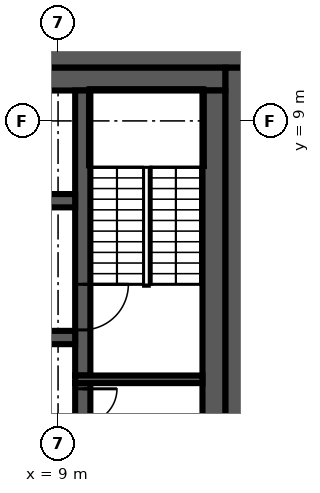
"""IFC4 building model, lengths in metres.
Left out: names, types, materials, properties, quantities, classifications, styles, units other than length and angle.
Written with IfcOpenShell. Run it as: python <this file> out.ifc"""

import sys

from ifc_helpers import new_model, si_unit, direction, frame, frame_2d, origin, place, context, subcontext, project, spatial, rectangle, extrude, element, fill, save


model = new_model("IFC4")
c1 = context("Model", 3, precision=1e-05, world=origin(), true_north=direction((0.0, 1.0)))
c2 = subcontext(c1, "Body", "Model", "MODEL_VIEW")
j1 = project(units=[si_unit("LENGTHUNIT", "METRE"), si_unit("PLANEANGLEUNIT", "RADIAN")], contexts=[c1])
p1 = place(None, origin())
s1 = spatial("IfcSite", under=j1, at=p1, CompositionType="ELEMENT")
p2 = place(p1, origin())
s2 = spatial("IfcBuilding", under=s1, at=p2, CompositionType="ELEMENT")
p3 = place(p2, frame((0.0, 0.0, 294.2)))
s3 = spatial("IfcBuildingStorey", under=s2, at=p3, CompositionType="ELEMENT", Elevation=294.2)
p4 = place(p3, frame((-14.0, 10.7, 0.0), z_axis=(0.0, 0.0, 1.0), x_axis=(1.0, 0.0, 0.0)))
e1 = element("IfcWall", 1, at=p4, inside=s3, PredefinedType="SHEAR", context=c2, shape_type="SweptSolid", body=[
    extrude(rectangle(XDim=28.0, YDim=0.6, at=frame_2d((14.0, 0.0))), origin(), (0.0, 0.0, 1.0), 3.82),
])
p5 = place(p4, frame((15.9, 0.0, 0.0)))
e2 = element("IfcOpeningElement", 2, at=p5, cuts=e1, PredefinedType="OPENING", context=c2, shape_type="SweptSolid", body=[
    extrude(rectangle(XDim=1.6, YDim=2.1, at=frame_2d((0.8, 1.05))), frame((0.0, 0.31, 0.0), z_axis=(0.0, -1.0, 0.0), x_axis=(1.0, 0.0, 0.0)), (0.0, 0.0, 1.0), 0.62),
])
p6 = place(p3, frame((13.7, 10.4, 0.0), z_axis=(0.0, 0.0, 1.0), x_axis=(0.0, -1.0, 0.0)))
e3 = element("IfcWall", 3, at=p6, inside=s3, PredefinedType="SHEAR", context=c2, shape_type="SweptSolid", body=[
    extrude(rectangle(XDim=20.8, YDim=0.6, at=frame_2d((10.4, 0.0))), origin(), (0.0, 0.0, 1.0), 3.82),
])
p7 = place(p3, frame((3.9, 10.1, 0.0), z_axis=(0.0, 0.0, 1.0), x_axis=(1.0, 0.0, 0.0)))
e4 = element("IfcWall", 4, at=p7, inside=s3, PredefinedType="SHEAR", context=c2, shape_type="SweptSolid", body=[
    extrude(rectangle(XDim=9.5, YDim=0.6, at=frame_2d((4.75, 0.0))), origin(), (0.0, 0.0, 1.0), 3.82),
])
p8 = place(p3, frame((13.1, 9.8, 0.0), z_axis=(0.0, 0.0, 1.0), x_axis=(0.0, -1.0, 0.0)))
e5 = element("IfcWall", 5, at=p8, inside=s3, PredefinedType="SHEAR", context=c2, shape_type="SweptSolid", body=[
    extrude(rectangle(XDim=19.6, YDim=0.6, at=frame_2d((9.8, 0.0))), origin(), (0.0, 0.0, 1.0), 3.82),
])
p9 = place(p3, frame((9.65, 2.1, 0.0), z_axis=(0.0, 0.0, 1.0), x_axis=(0.0, -1.0, 0.0)))
e6 = element("IfcWall", 6, at=p9, inside=s3, PredefinedType="SHEAR", context=c2, shape_type="SweptSolid", body=[
    extrude(rectangle(XDim=4.2, YDim=0.4, at=frame_2d((2.1, 0.0))), origin(), (0.0, 0.0, 1.0), 3.82),
])
p10 = place(p9, frame((0.15, 0.0, 0.0)))
e7 = element("IfcOpeningElement", 7, at=p10, cuts=e6, PredefinedType="OPENING", context=c2, shape_type="SweptSolid", body=[
    extrude(rectangle(XDim=0.9, YDim=2.1, at=frame_2d((0.45, 1.05))), frame((0.0, 0.21, 0.0), z_axis=(0.0, -1.0, 0.0), x_axis=(1.0, 0.0, 0.0)), (0.0, 0.0, 1.0), 0.42),
])
p11 = place(p3, frame((9.65, 9.8, 0.0), z_axis=(0.0, 0.0, 1.0), x_axis=(0.0, -1.0, 0.0)))
e8 = element("IfcWall", 8, at=p11, inside=s3, PredefinedType="SHEAR", context=c2, shape_type="SweptSolid", body=[
    extrude(rectangle(XDim=7.5, YDim=0.4, at=frame_2d((3.75, 0.0))), origin(), (0.0, 0.0, 1.0), 3.82),
])
p12 = place(p11, frame((5.1, 0.0, 0.0)))
e9 = element("IfcOpeningElement", 9, at=p12, cuts=e8, PredefinedType="OPENING", context=c2, shape_type="SweptSolid", body=[
    extrude(rectangle(XDim=1.2, YDim=2.1, at=frame_2d((0.6, 1.05))), frame((0.0, 0.21, 0.0), z_axis=(0.0, -1.0, 0.0), x_axis=(1.0, 0.0, 0.0)), (0.0, 0.0, 1.0), 0.42),
])
p13 = place(p3, frame((9.45, 2.2, 0.0), z_axis=(0.0, 0.0, 1.0), x_axis=(1.0, 0.0, 0.0)))
e10 = element("IfcWall", 10, at=p13, inside=s3, PredefinedType="SHEAR", context=c2, shape_type="SweptSolid", body=[
    extrude(rectangle(XDim=3.35, YDim=0.2, at=frame_2d((1.675, 0.0))), origin(), (0.0, 0.0, 1.0), 3.82),
])
p14 = place(p3, frame((-9.45, 6.9, 0.0), z_axis=(0.0, 0.0, 1.0), x_axis=(1.0, 0.0, 0.0)))
e11 = element("IfcWall", 11, at=p14, inside=s3, PredefinedType="SHEAR", context=c2, shape_type="SweptSolid", body=[
    extrude(rectangle(XDim=18.9, YDim=0.35, at=frame_2d((9.45, 0.0))), origin(), (0.0, 0.0, 1.0), 3.82),
])
p15 = place(p14, frame((11.55, 0.0, 0.0)))
e12 = element("IfcOpeningElement", 12, at=p15, cuts=e11, PredefinedType="OPENING", context=c2, shape_type="SweptSolid", body=[
    extrude(rectangle(XDim=1.2, YDim=2.1, at=frame_2d((0.6, 1.05))), frame((0.0, 0.185, 0.0), z_axis=(0.0, -1.0, 0.0), x_axis=(1.0, 0.0, 0.0)), (0.0, 0.0, 1.0), 0.37),
])
p16 = place(p14, frame((14.3, 0.0, 0.0)))
e13 = element("IfcOpeningElement", 13, at=p16, cuts=e11, PredefinedType="OPENING", context=c2, shape_type="SweptSolid", body=[
    extrude(rectangle(XDim=1.1, YDim=2.1, at=frame_2d((0.55, 1.05))), frame((0.0, 0.185, 0.0), z_axis=(0.0, -1.0, 0.0), x_axis=(1.0, 0.0, 0.0)), (0.0, 0.0, 1.0), 0.37),
])
p17 = place(p14, frame((17.0, 0.0, 0.0)))
e14 = element("IfcOpeningElement", 14, at=p17, cuts=e11, PredefinedType="OPENING", context=c2, shape_type="SweptSolid", body=[
    extrude(rectangle(XDim=1.1, YDim=2.1, at=frame_2d((0.55, 1.05))), frame((0.0, 0.185, 0.0), z_axis=(0.0, -1.0, 0.0), x_axis=(1.0, 0.0, 0.0)), (0.0, 0.0, 1.0), 0.37),
])
p18 = place(p14, frame((2.25, 0.0, 0.0)))
e15 = element("IfcOpeningElement", 15, at=p18, cuts=e11, PredefinedType="OPENING", context=c2, shape_type="SweptSolid", body=[
    extrude(rectangle(XDim=0.9, YDim=2.1, at=frame_2d((0.45, 1.05))), frame((0.0, 0.185, 0.0), z_axis=(0.0, -1.0, 0.0), x_axis=(1.0, 0.0, 0.0)), (0.0, 0.0, 1.0), 0.37),
])
p19 = place(p14, frame((7.65, 0.0, 0.0)))
e16 = element("IfcOpeningElement", 16, at=p19, cuts=e11, PredefinedType="OPENING", context=c2, shape_type="SweptSolid", body=[
    extrude(rectangle(XDim=0.9, YDim=2.1, at=frame_2d((0.45, 1.05))), frame((0.0, 0.185, 0.0), z_axis=(0.0, -1.0, 0.0), x_axis=(1.0, 0.0, 0.0)), (0.0, 0.0, 1.0), 0.37),
])
p20 = place(p3, frame((9.45, 3.3, 0.0), z_axis=(0.0, 0.0, 1.0), x_axis=(-1.0, 0.0, 0.0)))
e17 = element("IfcWall", 17, at=p20, inside=s3, PredefinedType="SHEAR", context=c2, shape_type="SweptSolid", body=[
    extrude(rectangle(XDim=18.9, YDim=0.35, at=frame_2d((9.45, 0.0))), origin(), (0.0, 0.0, 1.0), 3.82),
])
p21 = place(p20, frame((6.2, 0.0, 0.0)))
e18 = element("IfcOpeningElement", 18, at=p21, cuts=e17, PredefinedType="OPENING", context=c2, shape_type="SweptSolid", body=[
    extrude(rectangle(XDim=1.1, YDim=2.1, at=frame_2d((0.55, 1.05))), frame((0.0, 0.185, 0.0), z_axis=(0.0, -1.0, 0.0), x_axis=(1.0, 0.0, 0.0)), (0.0, 0.0, 1.0), 0.37),
])
p22 = place(p20, frame((3.5, 0.0, 0.0)))
e19 = element("IfcOpeningElement", 19, at=p22, cuts=e17, PredefinedType="OPENING", context=c2, shape_type="SweptSolid", body=[
    extrude(rectangle(XDim=1.1, YDim=2.1, at=frame_2d((0.55, 1.05))), frame((0.0, 0.185, 0.0), z_axis=(0.0, -1.0, 0.0), x_axis=(1.0, 0.0, 0.0)), (0.0, 0.0, 1.0), 0.37),
])
p23 = place(p20, frame((0.9, 0.0, 0.0)))
e20 = element("IfcOpeningElement", 20, at=p23, cuts=e17, PredefinedType="OPENING", context=c2, shape_type="SweptSolid", body=[
    extrude(rectangle(XDim=0.9, YDim=2.1, at=frame_2d((0.45, 1.05))), frame((0.0, 0.185, 0.0), z_axis=(0.0, -1.0, 0.0), x_axis=(1.0, 0.0, 0.0)), (0.0, 0.0, 1.0), 0.37),
])
p24 = place(p20, frame((15.75, 0.0, 0.0)))
e21 = element("IfcOpeningElement", 21, at=p24, cuts=e17, PredefinedType="OPENING", context=c2, shape_type="SweptSolid", body=[
    extrude(rectangle(XDim=0.9, YDim=2.1, at=frame_2d((0.45, 1.05))), frame((0.0, 0.185, 0.0), z_axis=(0.0, -1.0, 0.0), x_axis=(1.0, 0.0, 0.0)), (0.0, 0.0, 1.0), 0.37),
])
p25 = place(p20, frame((11.7, 0.0, 0.0)))
e22 = element("IfcOpeningElement", 22, at=p25, cuts=e17, PredefinedType="OPENING", context=c2, shape_type="SweptSolid", body=[
    extrude(rectangle(XDim=0.9, YDim=2.1, at=frame_2d((0.45, 1.05))), frame((0.0, 0.185, 0.0), z_axis=(0.0, -1.0, 0.0), x_axis=(1.0, 0.0, 0.0)), (0.0, 0.0, 1.0), 0.37),
])
p26 = place(p20, frame((9.0, 0.0, 0.0)))
e23 = element("IfcOpeningElement", 23, at=p26, cuts=e17, PredefinedType="OPENING", context=c2, shape_type="SweptSolid", body=[
    extrude(rectangle(XDim=0.9, YDim=2.1, at=frame_2d((0.45, 1.05))), frame((0.0, 0.185, 0.0), z_axis=(0.0, -1.0, 0.0), x_axis=(1.0, 0.0, 0.0)), (0.0, 0.0, 1.0), 0.37),
])
p27 = place(p10, origin())
e24 = element("IfcDoor", 24, at=p27, inside=s3, OperationType="SINGLE_SWING_RIGHT", PredefinedType="DOOR", context=c2, shape_type="SweptSolid", body=[
    extrude(rectangle(XDim=0.9, YDim=2.1, at=frame_2d((0.45, 1.05))), frame((0.0, 0.025, 0.0), z_axis=(0.0, -1.0, 0.0), x_axis=(1.0, 0.0, 0.0)), (0.0, 0.0, 1.0), 0.05),
])
fill(e7, e24)
p28 = place(p12, origin())
e25 = element("IfcDoor", 25, at=p28, inside=s3, OperationType="SINGLE_SWING_LEFT", PredefinedType="DOOR", context=c2, shape_type="SweptSolid", body=[
    extrude(rectangle(XDim=1.2, YDim=2.1, at=frame_2d((0.6, 1.05))), frame((0.0, 0.025, 0.0), z_axis=(0.0, -1.0, 0.0), x_axis=(1.0, 0.0, 0.0)), (0.0, 0.0, 1.0), 0.05),
])
fill(e9, e25)
save(model, sys.argv[1])
